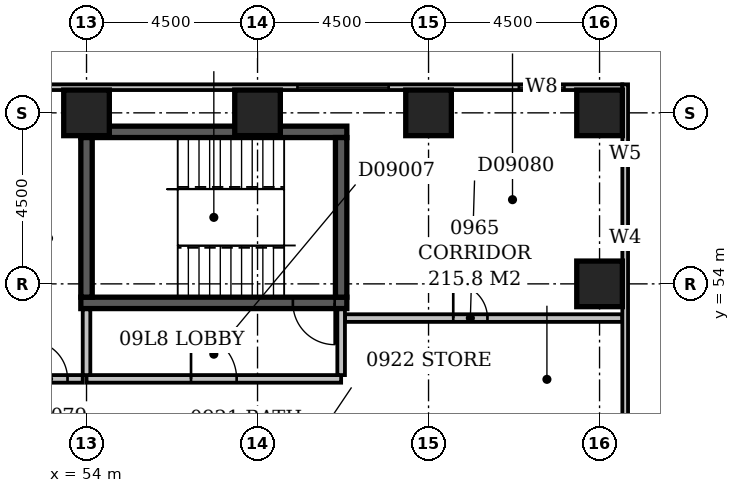
"""IFC4 building model, lengths in metres.
Left out: names, types, materials, properties, quantities, classifications, styles, units other than length and angle.
Written with IfcOpenShell. Run it as: python <this file> out.ifc"""

import sys

from ifc_helpers import new_model, si_unit, direction, frame, frame_2d, origin, origin_2d, place, context, subcontext, project, spatial, rectangle, extrude, element, fill, save


model = new_model("IFC4")
c1 = context("Model", 3, precision=1e-05, world=origin(), true_north=direction((0.0, 1.0)))
c2 = subcontext(c1, "Body", "Model", "MODEL_VIEW")
j1 = project(units=[si_unit("LENGTHUNIT", "METRE"), si_unit("PLANEANGLEUNIT", "RADIAN")], contexts=[c1])
p1 = place(None, origin())
s1 = spatial("IfcSite", under=j1, at=p1, CompositionType="ELEMENT")
p2 = place(p1, origin())
s2 = spatial("IfcBuilding", under=s1, at=p2, CompositionType="ELEMENT")
p3 = place(p2, frame((0.0, 0.0, 43.4)))
s3 = spatial("IfcBuildingStorey", under=s2, at=p3, CompositionType="ELEMENT", Elevation=43.4)
p4 = place(p3, frame((53.85, 53.5, -0.3), z_axis=(0.0, 0.0, 1.0), x_axis=(1.0, 0.0, 0.0)))
e1 = element("IfcWall", 1, at=p4, inside=s3, PredefinedType="SHEAR", context=c2, shape_type="SweptSolid", body=[
    extrude(rectangle(XDim=7.0, YDim=0.3, at=frame_2d((3.5, 0.0))), origin(), (0.0, 0.0, 1.0), 3.6),
])
p5 = place(p4, frame((5.58, 0.0, 0.3)))
e2 = element("IfcOpeningElement", 2, at=p5, cuts=e1, PredefinedType="OPENING", context=c2, shape_type="SweptSolid", body=[
    extrude(rectangle(XDim=1.1, YDim=2.1, at=frame_2d((0.55, 1.05))), frame((0.0, 0.162, 0.0), z_axis=(0.0, -1.0, 0.0), x_axis=(1.0, 0.0, 0.0)), (0.0, 0.0, 1.0), 0.324),
])
p6 = place(p3, frame((53.85, 58.0, -0.3), z_axis=(0.0, 0.0, 1.0), x_axis=(1.0, 0.0, 0.0)))
e3 = element("IfcWall", 3, at=p6, inside=s3, PredefinedType="SHEAR", context=c2, shape_type="SweptSolid", body=[
    extrude(rectangle(XDim=7.0, YDim=0.3, at=frame_2d((3.5, 0.0))), origin(), (0.0, 0.0, 1.0), 3.6),
])
for number, where, z_axis, x_axis in (
    (4, (54.0, 53.65, -0.3), (0.0, 0.0, 1.0), (0.0, 1.0, 0.0)),
    (5, (60.7, 53.65, -0.3), (0.0, 0.0, 1.0), (0.0, 1.0, 0.0)),
):
    element("IfcWall", number, at=place(p3, frame(where, z_axis=z_axis, x_axis=x_axis)), inside=s3, PredefinedType="SHEAR", context=c2, shape_type="SweptSolid", body=[
        extrude(rectangle(XDim=4.2, YDim=0.3, at=frame_2d((2.1, 0.0))), origin(), (0.0, 0.0, 1.0), 3.6),
    ])
for number, where, z_axis, x_axis in (
    (6, (67.5, 54.0, -0.3), (0.0, 0.0, 1.0), (1.0, 0.0, 0.0)),
    (7, (54.0, 58.5, -0.3), (0.0, 0.0, 1.0), (1.0, 0.0, 0.0)),
    (8, (58.5, 58.5, -0.3), (0.0, 0.0, 1.0), (1.0, 0.0, 0.0)),
    (9, (63.0, 58.5, -0.3), (0.0, 0.0, 1.0), (1.0, 0.0, 0.0)),
    (10, (67.5, 58.5, -0.3), (0.0, 0.0, 1.0), (1.0, 0.0, 0.0)),
):
    element("IfcColumn", number, at=place(p3, frame(where, z_axis=z_axis, x_axis=x_axis)), inside=s3, PredefinedType="COLUMN", context=c2, shape_type="SweptSolid", body=[
        extrude(rectangle(XDim=1.2, YDim=1.2, at=origin_2d()), origin(), (0.0, 0.0, 1.0), 3.6),
    ])
p7 = place(p3, frame((68.175, 35.4, 0.0), z_axis=(0.0, 0.0, 1.0), x_axis=(0.0, 1.0, 0.0)))
e11 = element("IfcWall", 11, at=p7, inside=s3, PredefinedType="STANDARD", context=c2, shape_type="SweptSolid", body=[
    extrude(rectangle(XDim=23.85, YDim=0.15, at=frame_2d((11.925, 0.0))), origin(), (0.0, 0.0, 1.0), 2.7),
])
p8 = place(p7, frame((1.523, 0.0, 0.6)))
e12 = element("IfcOpeningElement", 12, at=p8, cuts=e11, PredefinedType="OPENING", context=c2, shape_type="SweptSolid", body=[
    extrude(rectangle(XDim=1.2, YDim=1.8, at=frame_2d((0.6, 0.9))), frame((0.0, 0.087, 0.0), z_axis=(0.0, -1.0, 0.0), x_axis=(1.0, 0.0, 0.0)), (0.0, 0.0, 1.0), 0.174),
])
p9 = place(p7, frame((19.5, 0.0, 0.6)))
e13 = element("IfcOpeningElement", 13, at=p9, cuts=e11, PredefinedType="OPENING", context=c2, shape_type="SweptSolid", body=[
    extrude(rectangle(XDim=0.6, YDim=1.8, at=frame_2d((0.3, 0.9))), frame((0.0, 0.087, 0.0), z_axis=(0.0, -1.0, 0.0), x_axis=(1.0, 0.0, 0.0)), (0.0, 0.0, 1.0), 0.174),
])
p10 = place(p7, frame((21.78, 0.0, 0.6)))
e14 = element("IfcOpeningElement", 14, at=p10, cuts=e11, PredefinedType="OPENING", context=c2, shape_type="SweptSolid", body=[
    extrude(rectangle(XDim=0.45, YDim=1.8, at=frame_2d((0.225, 0.9))), frame((0.0, 0.087, 0.0), z_axis=(0.0, -1.0, 0.0), x_axis=(1.0, 0.0, 0.0)), (0.0, 0.0, 1.0), 0.174),
])
p11 = place(p3, frame((68.1, 59.175, 0.0), z_axis=(0.0, 0.0, 1.0), x_axis=(-1.0, 0.0, 0.0)))
e15 = element("IfcWall", 15, at=p11, inside=s3, PredefinedType="STANDARD", context=c2, shape_type="SweptSolid", body=[
    extrude(rectangle(XDim=68.85, YDim=0.15, at=frame_2d((34.425, 0.0))), origin(), (0.0, 0.0, 1.0), 2.7),
])
p12 = place(p11, frame((1.523, 0.0, 0.6)))
e16 = element("IfcOpeningElement", 16, at=p12, cuts=e15, PredefinedType="OPENING", context=c2, shape_type="SweptSolid", body=[
    extrude(rectangle(XDim=1.2, YDim=1.8, at=frame_2d((0.6, 0.9))), frame((0.0, 0.087, 0.0), z_axis=(0.0, -1.0, 0.0), x_axis=(1.0, 0.0, 0.0)), (0.0, 0.0, 1.0), 0.174),
])
p13 = place(p11, frame((6.15, 0.0, 0.6)))
e17 = element("IfcOpeningElement", 17, at=p13, cuts=e15, PredefinedType="OPENING", context=c2, shape_type="SweptSolid", body=[
    extrude(rectangle(XDim=2.4, YDim=1.8, at=frame_2d((1.2, 0.9))), frame((0.0, 0.087, 0.0), z_axis=(0.0, -1.0, 0.0), x_axis=(1.0, 0.0, 0.0)), (0.0, 0.0, 1.0), 0.174),
])
p14 = place(p3, frame((54.0, 51.5, 0.0), z_axis=(0.0, 0.0, 1.0), x_axis=(1.0, 0.0, 0.0)))
e18 = element("IfcWall", 18, at=p14, inside=s3, PredefinedType="PARTITIONING", context=c2, shape_type="SweptSolid", body=[
    extrude(rectangle(XDim=6.7, YDim=0.2, at=frame_2d((3.35, 0.0))), origin(), (0.0, 0.0, 1.0), 3.3),
])
p15 = place(p14, frame((2.75, 0.0, 0.0)))
e19 = element("IfcOpeningElement", 19, at=p15, cuts=e18, PredefinedType="OPENING", context=c2, shape_type="SweptSolid", body=[
    extrude(rectangle(XDim=1.2, YDim=2.1, at=frame_2d((0.6, 1.05))), frame((0.0, 0.112, 0.0), z_axis=(0.0, -1.0, 0.0), x_axis=(1.0, 0.0, 0.0)), (0.0, 0.0, 1.0), 0.224),
])
p16 = place(p3, frame((60.7, 51.6, 0.0), z_axis=(0.0, 0.0, 1.0), x_axis=(0.0, 1.0, 0.0)))
e20 = element("IfcWall", 20, at=p16, inside=s3, PredefinedType="PARTITIONING", context=c2, shape_type="SweptSolid", body=[
    extrude(rectangle(XDim=1.73, YDim=0.2, at=frame_2d((0.865, 0.0))), origin(), (0.0, 0.0, 1.0), 3.3),
])
p17 = place(p3, frame((54.0, 51.6, 0.0), z_axis=(0.0, 0.0, 1.0), x_axis=(0.0, 1.0, 0.0)))
e21 = element("IfcWall", 21, at=p17, inside=s3, PredefinedType="PARTITIONING", context=c2, shape_type="SweptSolid", body=[
    extrude(rectangle(XDim=1.73, YDim=0.2, at=frame_2d((0.865, 0.0))), origin(), (0.0, 0.0, 1.0), 2.6),
])
p18 = place(p3, frame((52.1, 51.5, 0.0), z_axis=(0.0, 0.0, 1.0), x_axis=(1.0, 0.0, 0.0)))
e22 = element("IfcWall", 22, at=p18, inside=s3, PredefinedType="PARTITIONING", context=c2, shape_type="SweptSolid", body=[
    extrude(rectangle(XDim=1.8, YDim=0.2, at=frame_2d((0.9, 0.0))), origin(), (0.0, 0.0, 1.0), 3.3),
])
p19 = place(p18, frame((0.4, 0.0, 0.0)))
e23 = element("IfcOpeningElement", 23, at=p19, cuts=e22, PredefinedType="OPENING", context=c2, shape_type="SweptSolid", body=[
    extrude(rectangle(XDim=1.0, YDim=2.1, at=frame_2d((0.5, 1.05))), frame((0.0, 0.112, 0.0), z_axis=(0.0, -1.0, 0.0), x_axis=(1.0, 0.0, 0.0)), (0.0, 0.0, 1.0), 0.224),
])
p20 = place(p3, frame((60.8, 53.1, 0.0), z_axis=(0.0, 0.0, 1.0), x_axis=(1.0, 0.0, 0.0)))
e24 = element("IfcWall", 24, at=p20, inside=s3, PredefinedType="PARTITIONING", context=c2, shape_type="SweptSolid", body=[
    extrude(rectangle(XDim=7.3, YDim=0.2, at=frame_2d((3.65, 0.0))), origin(), (0.0, 0.0, 1.0), 3.3),
])
p21 = place(p20, frame((2.85, 0.0, 0.0)))
e25 = element("IfcOpeningElement", 25, at=p21, cuts=e24, PredefinedType="OPENING", context=c2, shape_type="SweptSolid", body=[
    extrude(rectangle(XDim=0.9, YDim=2.1, at=frame_2d((0.45, 1.05))), frame((0.0, 0.112, 0.0), z_axis=(0.0, -1.0, 0.0), x_axis=(1.0, 0.0, 0.0)), (0.0, 0.0, 1.0), 0.224),
])
p22 = place(p9, origin())
e26 = element("IfcWindow", 26, at=p22, inside=s3, PartitioningType="SINGLE_PANEL", PredefinedType="WINDOW", context=c2, shape_type="SweptSolid", body=[
    extrude(rectangle(XDim=0.6, YDim=1.8, at=frame_2d((0.3, 0.9))), frame((0.0, 0.03, 0.0), z_axis=(0.0, -1.0, 0.0), x_axis=(1.0, 0.0, 0.0)), (0.0, 0.0, 1.0), 0.06),
])
fill(e13, e26)
p23 = place(p10, origin())
e27 = element("IfcWindow", 27, at=p23, inside=s3, PartitioningType="SINGLE_PANEL", PredefinedType="WINDOW", context=c2, shape_type="SweptSolid", body=[
    extrude(rectangle(XDim=0.45, YDim=1.8, at=frame_2d((0.225, 0.9))), frame((0.0, 0.03, 0.0), z_axis=(0.0, -1.0, 0.0), x_axis=(1.0, 0.0, 0.0)), (0.0, 0.0, 1.0), 0.06),
])
fill(e14, e27)
p24 = place(p12, origin())
e28 = element("IfcWindow", 28, at=p24, inside=s3, PartitioningType="SINGLE_PANEL", PredefinedType="WINDOW", context=c2, shape_type="SweptSolid", body=[
    extrude(rectangle(XDim=1.2, YDim=1.8, at=frame_2d((0.6, 0.9))), frame((0.0, 0.03, 0.0), z_axis=(0.0, -1.0, 0.0), x_axis=(1.0, 0.0, 0.0)), (0.0, 0.0, 1.0), 0.06),
])
fill(e16, e28)
p25 = place(p13, origin())
e29 = element("IfcWindow", 29, at=p25, inside=s3, PartitioningType="SINGLE_PANEL", PredefinedType="WINDOW", context=c2, shape_type="SweptSolid", body=[
    extrude(rectangle(XDim=2.4, YDim=1.8, at=frame_2d((1.2, 0.9))), frame((0.0, 0.03, 0.0), z_axis=(0.0, -1.0, 0.0), x_axis=(1.0, 0.0, 0.0)), (0.0, 0.0, 1.0), 0.06),
])
fill(e17, e29)
p26 = place(p15, origin())
e30 = element("IfcDoor", 30, at=p26, inside=s3, OperationType="SINGLE_SWING_LEFT", PredefinedType="DOOR", context=c2, shape_type="SweptSolid", body=[
    extrude(rectangle(XDim=1.2, YDim=2.1, at=frame_2d((0.6, 1.05))), frame((0.0, 0.025, 0.0), z_axis=(0.0, -1.0, 0.0), x_axis=(1.0, 0.0, 0.0)), (0.0, 0.0, 1.0), 0.05),
])
fill(e19, e30)
p27 = place(p5, origin())
e31 = element("IfcDoor", 31, at=p27, inside=s3, OperationType="SINGLE_SWING_RIGHT", PredefinedType="DOOR", context=c2, shape_type="SweptSolid", body=[
    extrude(rectangle(XDim=1.1, YDim=2.1, at=frame_2d((0.55, 1.05))), frame((0.0, 0.025, 0.0), z_axis=(0.0, -1.0, 0.0), x_axis=(1.0, 0.0, 0.0)), (0.0, 0.0, 1.0), 0.05),
])
fill(e2, e31)
p28 = place(p19, origin())
e32 = element("IfcDoor", 32, at=p28, inside=s3, OperationType="SINGLE_SWING_LEFT", PredefinedType="DOOR", context=c2, shape_type="SweptSolid", body=[
    extrude(rectangle(XDim=1.0, YDim=2.1, at=frame_2d((0.5, 1.05))), frame((0.0, 0.025, 0.0), z_axis=(0.0, -1.0, 0.0), x_axis=(1.0, 0.0, 0.0)), (0.0, 0.0, 1.0), 0.05),
])
fill(e23, e32)
p29 = place(p21, origin())
e33 = element("IfcDoor", 33, at=p29, inside=s3, OperationType="SINGLE_SWING_LEFT", PredefinedType="DOOR", context=c2, shape_type="SweptSolid", body=[
    extrude(rectangle(XDim=0.9, YDim=2.1, at=frame_2d((0.45, 1.05))), frame((0.0, 0.025, 0.0), z_axis=(0.0, -1.0, 0.0), x_axis=(1.0, 0.0, 0.0)), (0.0, 0.0, 1.0), 0.05),
])
fill(e25, e33)
save(model, sys.argv[1])
